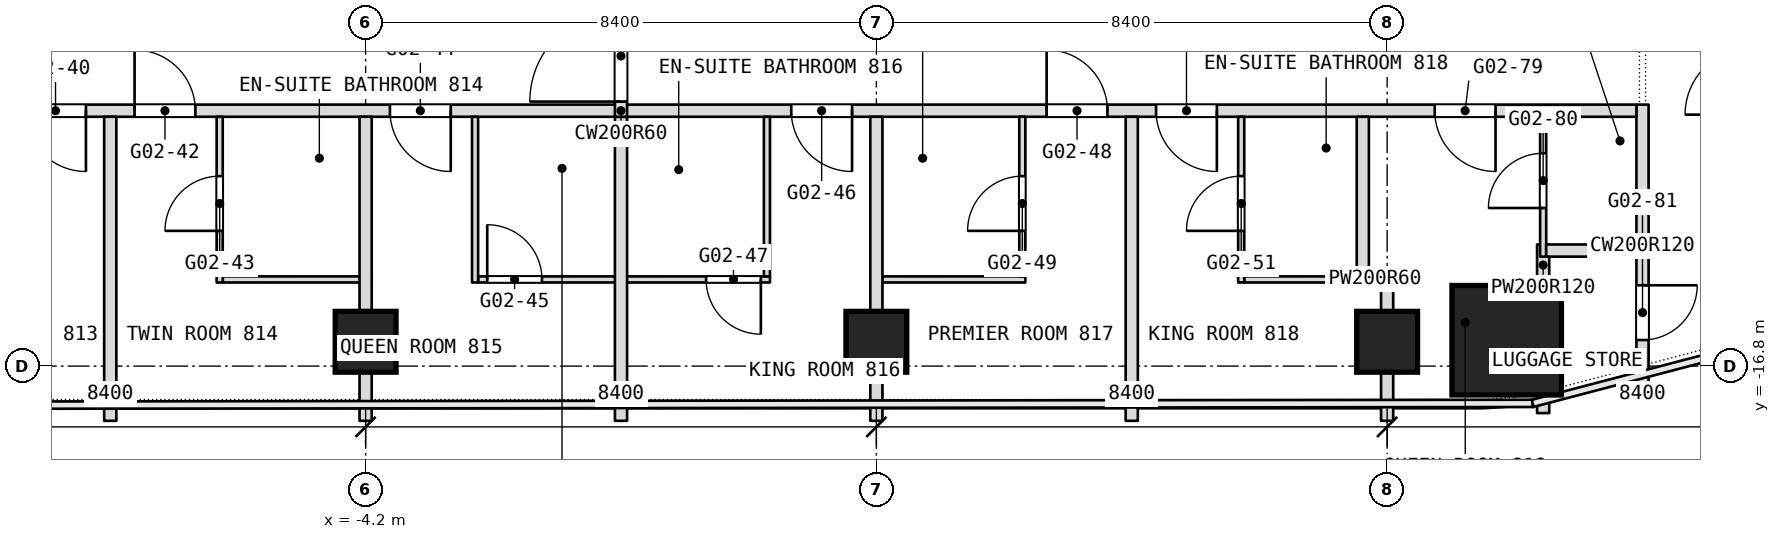
"""IFC4 building model, lengths in metres.
Left out: names, types, materials, properties, quantities, classifications, styles, units other than length and angle.
Written with IfcOpenShell. Run it as: python <this file> out.ifc"""

import sys

from ifc_helpers import new_model, si_unit, direction, frame, frame_2d, origin, origin_2d, place, context, subcontext, project, spatial, rectangle, extrude, element, fill, save


model = new_model("IFC4")
c1 = context("Model", 3, precision=1e-05, world=origin(), true_north=direction((0.0, 1.0)))
c2 = subcontext(c1, "Body", "Model", "MODEL_VIEW")
j1 = project(units=[si_unit("LENGTHUNIT", "METRE"), si_unit("PLANEANGLEUNIT", "RADIAN")], contexts=[c1])
p1 = place(None, origin())
s1 = spatial("IfcSite", under=j1, at=p1, CompositionType="ELEMENT")
p2 = place(p1, origin())
s2 = spatial("IfcBuilding", under=s1, at=p2, CompositionType="ELEMENT")
p3 = place(p2, frame((0.0, 0.0, 43.7)))
s3 = spatial("IfcBuildingStorey", under=s2, at=p3, CompositionType="ELEMENT", Elevation=43.7)
p4 = place(p3, frame((14.566, -16.375, 0.0), z_axis=(0.0, 0.0, 1.0), x_axis=(1.0, 0.0, 0.0)))
e1 = element("IfcColumn", 1, at=p4, inside=s3, PredefinedType="COLUMN", context=c2, shape_type="SweptSolid", body=[
    extrude(rectangle(XDim=1.8, YDim=1.8, at=origin_2d()), origin(), (0.0, 0.0, 1.0), 3.6),
])
for number, where, z_axis, x_axis in (
    (2, (12.6, -16.4, 0.0), (0.0, 0.0, 1.0), (1.0, 0.0, 0.0)),
    (3, (4.2, -16.4, 0.0), (0.0, 0.0, 1.0), (1.0, 0.0, 0.0)),
    (4, (-4.2, -16.4, 0.0), (0.0, 0.0, 1.0), (1.0, 0.0, 0.0)),
):
    element("IfcColumn", number, at=place(p3, frame(where, z_axis=z_axis, x_axis=x_axis)), inside=s3, PredefinedType="COLUMN", context=c2, shape_type="SweptSolid", body=[
        extrude(rectangle(XDim=1.0, YDim=1.0, at=origin_2d()), origin(), (0.0, 0.0, 1.0), 3.6),
    ])
p5 = place(p3, frame((16.8, -17.143, 0.0), z_axis=(0.0, 0.0, 1.0), x_axis=(0.0, 1.0, 0.0)))
e5 = element("IfcWall", 5, at=p5, inside=s3, PredefinedType="PARTITIONING", context=c2, shape_type="SweptSolid", body=[
    extrude(rectangle(XDim=4.643, YDim=0.2, at=frame_2d((2.322, 0.0))), origin(), (0.0, 0.0, 1.0), 3.34),
])
p6 = place(p5, frame((0.772, 0.0, 0.0)))
e6 = element("IfcOpeningElement", 6, at=p6, cuts=e5, PredefinedType="OPENING", context=c2, shape_type="SweptSolid", body=[
    extrude(rectangle(XDim=0.9, YDim=2.1, at=frame_2d((0.45, 1.05))), frame((0.0, 0.1, 0.0), z_axis=(0.0, -1.0, 0.0), x_axis=(1.0, 0.0, 0.0)), (0.0, 0.0, 1.0), 0.2),
])
p7 = place(p3, frame((12.1, -15.375, 0.0), z_axis=(0.0, 0.0, 1.0), x_axis=(1.0, 0.0, 0.0)))
e7 = element("IfcWall", 7, at=p7, inside=s3, PredefinedType="PARTITIONING", context=c2, shape_type="SweptSolid", body=[
    extrude(rectangle(XDim=0.6, YDim=0.2, at=frame_2d((0.3, 0.0))), origin(), (0.0, 0.0, 1.0), 3.34),
])
p8 = place(p3, frame((-6.55, -15.375, 0.0), z_axis=(0.0, 0.0, 1.0), x_axis=(1.0, 0.0, 0.0)))
e8 = element("IfcWall", 8, at=p8, inside=s3, PredefinedType="PARTITIONING", context=c2, shape_type="SweptSolid", body=[
    extrude(rectangle(XDim=2.45, YDim=0.1, at=frame_2d((1.225, 0.0))), origin(), (0.0, 0.0, 1.0), 3.34),
])
p9 = place(p3, frame((-2.35, -15.375, 0.0), z_axis=(0.0, 0.0, 1.0), x_axis=(1.0, 0.0, 0.0)))
e9 = element("IfcWall", 9, at=p9, inside=s3, PredefinedType="PARTITIONING", context=c2, shape_type="SweptSolid", body=[
    extrude(rectangle(XDim=4.8, YDim=0.1, at=frame_2d((2.4, 0.0))), origin(), (0.0, 0.0, 1.0), 3.34),
])
p10 = place(p9, frame((0.15, 0.0, 0.0)))
e10 = element("IfcOpeningElement", 10, at=p10, cuts=e9, PredefinedType="OPENING", context=c2, shape_type="SweptSolid", body=[
    extrude(rectangle(XDim=0.9, YDim=2.1, at=frame_2d((0.45, 1.05))), frame((0.0, 0.05, 0.0), z_axis=(0.0, -1.0, 0.0), x_axis=(1.0, 0.0, 0.0)), (0.0, 0.0, 1.0), 0.1),
])
p11 = place(p9, frame((3.75, 0.0, 0.0)))
e11 = element("IfcOpeningElement", 11, at=p11, cuts=e9, PredefinedType="OPENING", context=c2, shape_type="SweptSolid", body=[
    extrude(rectangle(XDim=0.9, YDim=2.1, at=frame_2d((0.45, 1.05))), frame((0.0, 0.05, 0.0), z_axis=(0.0, -1.0, 0.0), x_axis=(1.0, 0.0, 0.0)), (0.0, 0.0, 1.0), 0.1),
])
p12 = place(p3, frame((4.3, -15.375, 0.0), z_axis=(0.0, 0.0, 1.0), x_axis=(1.0, 0.0, 0.0)))
e12 = element("IfcWall", 12, at=p12, inside=s3, PredefinedType="PARTITIONING", context=c2, shape_type="SweptSolid", body=[
    extrude(rectangle(XDim=2.35, YDim=0.1, at=frame_2d((1.175, 0.0))), origin(), (0.0, 0.0, 1.0), 3.34),
])
p13 = place(p3, frame((10.25, -15.375, 0.0), z_axis=(0.0, 0.0, 1.0), x_axis=(1.0, 0.0, 0.0)))
e13 = element("IfcWall", 13, at=p13, inside=s3, PredefinedType="PARTITIONING", context=c2, shape_type="SweptSolid", body=[
    extrude(rectangle(XDim=2.05, YDim=0.1, at=frame_2d((1.025, 0.0))), origin(), (0.0, 0.0, 1.0), 3.34),
])
p14 = place(p3, frame((15.166, -17.573, 0.0), z_axis=(0.0, 0.0, 1.0), x_axis=(0.0, 1.0, 0.0)))
e14 = element("IfcWall", 14, at=p14, inside=s3, PredefinedType="PARTITIONING", context=c2, shape_type="SweptSolid", body=[
    extrude(rectangle(XDim=0.298, YDim=0.2, at=frame_2d((0.149, 0.0))), origin(), (0.0, 0.0, 1.0), 3.34),
])
p15 = place(p3, frame((15.166, -15.475, 0.0), z_axis=(0.0, 0.0, 1.0), x_axis=(0.0, 1.0, 0.0)))
e15 = element("IfcWall", 15, at=p15, inside=s3, PredefinedType="PARTITIONING", context=c2, shape_type="SweptSolid", body=[
    extrude(rectangle(XDim=0.675, YDim=0.2, at=frame_2d((0.337, 0.0))), origin(), (0.0, 0.0, 1.0), 3.34),
])
p16 = place(p3, frame((15.166, -15.0, 0.0), z_axis=(0.0, 0.0, 1.0), x_axis=(0.0, 1.0, 0.0)))
e16 = element("IfcWall", 16, at=p16, inside=s3, PredefinedType="PARTITIONING", context=c2, shape_type="SweptSolid", body=[
    extrude(rectangle(XDim=2.3, YDim=0.1, at=frame_2d((1.15, 0.0))), origin(), (0.0, 0.0, 1.0), 3.34),
])
p17 = place(p16, frame((0.8, 0.0, 0.0)))
e17 = element("IfcOpeningElement", 17, at=p17, cuts=e16, PredefinedType="OPENING", context=c2, shape_type="SweptSolid", body=[
    extrude(rectangle(XDim=0.9, YDim=2.1, at=frame_2d((0.45, 1.05))), frame((0.0, 0.05, 0.0), z_axis=(0.0, -1.0, 0.0), x_axis=(1.0, 0.0, 0.0)), (0.0, 0.0, 1.0), 0.1),
])
p18 = place(p3, frame((15.216, -14.9, 0.0), z_axis=(0.0, 0.0, 1.0), x_axis=(1.0, 0.0, 0.0)))
e18 = element("IfcWall", 18, at=p18, inside=s3, PredefinedType="PARTITIONING", context=c2, shape_type="SweptSolid", body=[
    extrude(rectangle(XDim=1.484, YDim=0.2, at=frame_2d((0.742, 0.0))), origin(), (0.0, 0.0, 1.0), 3.34),
])
p19 = place(p3, frame((12.6, -17.7, 0.0), z_axis=(0.0, 0.0, 1.0), x_axis=(0.0, 1.0, 0.0)))
e19 = element("IfcWall", 19, at=p19, inside=s3, PredefinedType="PARTITIONING", context=c2, shape_type="SweptSolid", body=[
    extrude(rectangle(XDim=2.225, YDim=0.2, at=frame_2d((1.112, 0.0))), origin(), (0.0, 0.0, 1.0), 3.34),
])
p20 = place(p3, frame((-16.7, -12.6, 0.0), z_axis=(0.0, 0.0, 1.0), x_axis=(1.0, 0.0, 0.0)))
e20 = element("IfcWall", 20, at=p20, inside=s3, PredefinedType="PARTITIONING", context=c2, shape_type="SweptSolid", body=[
    extrude(rectangle(XDim=33.4, YDim=0.2, at=frame_2d((16.7, 0.0))), origin(), (0.0, 0.0, 1.0), 3.34),
])
p21 = place(p20, frame((6.9, 0.0, 0.0)))
e21 = element("IfcOpeningElement", 21, at=p21, cuts=e20, PredefinedType="OPENING", context=c2, shape_type="SweptSolid", body=[
    extrude(rectangle(XDim=1.0, YDim=2.1, at=frame_2d((0.5, 1.05))), frame((0.0, 0.1, 0.0), z_axis=(0.0, -1.0, 0.0), x_axis=(1.0, 0.0, 0.0)), (0.0, 0.0, 1.0), 0.2),
])
p22 = place(p20, frame((8.7, 0.0, 0.0)))
e22 = element("IfcOpeningElement", 22, at=p22, cuts=e20, PredefinedType="OPENING", context=c2, shape_type="SweptSolid", body=[
    extrude(rectangle(XDim=1.0, YDim=2.1, at=frame_2d((0.5, 1.05))), frame((0.0, 0.1, 0.0), z_axis=(0.0, -1.0, 0.0), x_axis=(1.0, 0.0, 0.0)), (0.0, 0.0, 1.0), 0.2),
])
p23 = place(p20, frame((12.9, 0.0, 0.0)))
e23 = element("IfcOpeningElement", 23, at=p23, cuts=e20, PredefinedType="OPENING", context=c2, shape_type="SweptSolid", body=[
    extrude(rectangle(XDim=1.0, YDim=2.1, at=frame_2d((0.5, 1.05))), frame((0.0, 0.1, 0.0), z_axis=(0.0, -1.0, 0.0), x_axis=(1.0, 0.0, 0.0)), (0.0, 0.0, 1.0), 0.2),
])
p24 = place(p20, frame((19.5, 0.0, 0.0)))
e24 = element("IfcOpeningElement", 24, at=p24, cuts=e20, PredefinedType="OPENING", context=c2, shape_type="SweptSolid", body=[
    extrude(rectangle(XDim=1.0, YDim=2.1, at=frame_2d((0.5, 1.05))), frame((0.0, 0.1, 0.0), z_axis=(0.0, -1.0, 0.0), x_axis=(1.0, 0.0, 0.0)), (0.0, 0.0, 1.0), 0.2),
])
p25 = place(p20, frame((23.7, 0.0, 0.0)))
e25 = element("IfcOpeningElement", 25, at=p25, cuts=e20, PredefinedType="OPENING", context=c2, shape_type="SweptSolid", body=[
    extrude(rectangle(XDim=1.0, YDim=2.1, at=frame_2d((0.5, 1.05))), frame((0.0, 0.1, 0.0), z_axis=(0.0, -1.0, 0.0), x_axis=(1.0, 0.0, 0.0)), (0.0, 0.0, 1.0), 0.2),
])
p26 = place(p20, frame((25.5, 0.0, 0.0)))
e26 = element("IfcOpeningElement", 26, at=p26, cuts=e20, PredefinedType="OPENING", context=c2, shape_type="SweptSolid", body=[
    extrude(rectangle(XDim=1.0, YDim=2.1, at=frame_2d((0.5, 1.05))), frame((0.0, 0.1, 0.0), z_axis=(0.0, -1.0, 0.0), x_axis=(1.0, 0.0, 0.0)), (0.0, 0.0, 1.0), 0.2),
])
p27 = place(p20, frame((2.317, 0.0, 0.0)))
e27 = element("IfcOpeningElement", 27, at=p27, cuts=e20, PredefinedType="OPENING", context=c2, shape_type="SweptSolid", body=[
    extrude(rectangle(XDim=1.0, YDim=2.1, at=frame_2d((0.5, 1.05))), frame((0.0, 0.1, 0.0), z_axis=(0.0, -1.0, 0.0), x_axis=(1.0, 0.0, 0.0)), (0.0, 0.0, 1.0), 0.2),
])
p28 = place(p20, frame((30.083, 0.0, 0.0)))
e28 = element("IfcOpeningElement", 28, at=p28, cuts=e20, PredefinedType="OPENING", context=c2, shape_type="SweptSolid", body=[
    extrude(rectangle(XDim=1.0, YDim=2.1, at=frame_2d((0.5, 1.05))), frame((0.0, 0.1, 0.0), z_axis=(0.0, -1.0, 0.0), x_axis=(1.0, 0.0, 0.0)), (0.0, 0.0, 1.0), 0.2),
])
p29 = place(p3, frame((12.2, -15.325, 0.0), z_axis=(0.0, 0.0, 1.0), x_axis=(0.0, 1.0, 0.0)))
e29 = element("IfcWall", 29, at=p29, inside=s3, PredefinedType="PARTITIONING", context=c2, shape_type="SweptSolid", body=[
    extrude(rectangle(XDim=2.625, YDim=0.2, at=frame_2d((1.312, 0.0))), origin(), (0.0, 0.0, 1.0), 3.34),
])
p30 = place(p3, frame((10.2, -15.425, 0.0), z_axis=(0.0, 0.0, 1.0), x_axis=(0.0, 1.0, 0.0)))
e30 = element("IfcWall", 30, at=p30, inside=s3, PredefinedType="PARTITIONING", context=c2, shape_type="SweptSolid", body=[
    extrude(rectangle(XDim=2.725, YDim=0.1, at=frame_2d((1.363, 0.0))), origin(), (0.0, 0.0, 1.0), 3.34),
])
p31 = place(p30, frame((0.849, 0.0, 0.0)))
e31 = element("IfcOpeningElement", 31, at=p31, cuts=e30, PredefinedType="OPENING", context=c2, shape_type="SweptSolid", body=[
    extrude(rectangle(XDim=0.9, YDim=2.1, at=frame_2d((0.45, 1.05))), frame((0.0, 0.05, 0.0), z_axis=(0.0, -1.0, 0.0), x_axis=(1.0, 0.0, 0.0)), (0.0, 0.0, 1.0), 0.1),
])
p32 = place(p3, frame((8.4, -17.7, 0.0), z_axis=(0.0, 0.0, 1.0), x_axis=(0.0, 1.0, 0.0)))
e32 = element("IfcWall", 32, at=p32, inside=s3, PredefinedType="PARTITIONING", context=c2, shape_type="SweptSolid", body=[
    extrude(rectangle(XDim=5.0, YDim=0.2, at=frame_2d((2.5, 0.0))), origin(), (0.0, 0.0, 1.0), 3.34),
])
p33 = place(p3, frame((6.6, -15.325, 0.0), z_axis=(0.0, 0.0, 1.0), x_axis=(0.0, 1.0, 0.0)))
e33 = element("IfcWall", 33, at=p33, inside=s3, PredefinedType="PARTITIONING", context=c2, shape_type="SweptSolid", body=[
    extrude(rectangle(XDim=2.625, YDim=0.1, at=frame_2d((1.312, 0.0))), origin(), (0.0, 0.0, 1.0), 3.34),
])
p34 = place(p33, frame((0.749, 0.0, 0.0)))
e34 = element("IfcOpeningElement", 34, at=p34, cuts=e33, PredefinedType="OPENING", context=c2, shape_type="SweptSolid", body=[
    extrude(rectangle(XDim=0.9, YDim=2.1, at=frame_2d((0.45, 1.05))), frame((0.0, 0.05, 0.0), z_axis=(0.0, -1.0, 0.0), x_axis=(1.0, 0.0, 0.0)), (0.0, 0.0, 1.0), 0.1),
])
p35 = place(p3, frame((4.2, -17.7, 0.0), z_axis=(0.0, 0.0, 1.0), x_axis=(0.0, 1.0, 0.0)))
e35 = element("IfcWall", 35, at=p35, inside=s3, PredefinedType="PARTITIONING", context=c2, shape_type="SweptSolid", body=[
    extrude(rectangle(XDim=5.0, YDim=0.2, at=frame_2d((2.5, 0.0))), origin(), (0.0, 0.0, 1.0), 3.34),
])
p36 = place(p3, frame((2.4, -15.325, 0.0), z_axis=(0.0, 0.0, 1.0), x_axis=(0.0, 1.0, 0.0)))
e36 = element("IfcWall", 36, at=p36, inside=s3, PredefinedType="PARTITIONING", context=c2, shape_type="SweptSolid", body=[
    extrude(rectangle(XDim=2.625, YDim=0.1, at=frame_2d((1.312, 0.0))), origin(), (0.0, 0.0, 1.0), 3.34),
])
p37 = place(p3, frame((0.0, -17.7, 0.0), z_axis=(0.0, 0.0, 1.0), x_axis=(0.0, 1.0, 0.0)))
e37 = element("IfcWall", 37, at=p37, inside=s3, PredefinedType="PARTITIONING", context=c2, shape_type="SweptSolid", body=[
    extrude(rectangle(XDim=5.0, YDim=0.2, at=frame_2d((2.5, 0.0))), origin(), (0.0, 0.0, 1.0), 3.34),
])
p38 = place(p3, frame((0.0, -12.7, 0.0), z_axis=(0.0, 0.0, 1.0), x_axis=(0.0, 1.0, 0.0)))
e38 = element("IfcWall", 38, at=p38, inside=s3, PredefinedType="PARTITIONING", context=c2, shape_type="SweptSolid", body=[
    extrude(rectangle(XDim=12.7, YDim=0.2, at=frame_2d((6.35, 0.0))), origin(), (0.0, 0.0, 1.0), 3.34),
])
p39 = place(p38, frame((11.05, 0.0, 0.0)))
e39 = element("IfcOpeningElement", 39, at=p39, cuts=e38, PredefinedType="OPENING", context=c2, shape_type="SweptSolid", body=[
    extrude(rectangle(XDim=1.5, YDim=2.1, at=frame_2d((0.75, 1.05))), frame((0.0, 0.1, 0.0), z_axis=(0.0, -1.0, 0.0), x_axis=(1.0, 0.0, 0.0)), (0.0, 0.0, 1.0), 0.2),
])
p40 = place(p38, frame((0.25, 0.0, 0.0)))
e40 = element("IfcOpeningElement", 40, at=p40, cuts=e38, PredefinedType="OPENING", context=c2, shape_type="SweptSolid", body=[
    extrude(rectangle(XDim=1.5, YDim=2.1, at=frame_2d((0.75, 1.05))), frame((0.0, 0.1, 0.0), z_axis=(0.0, -1.0, 0.0), x_axis=(1.0, 0.0, 0.0)), (0.0, 0.0, 1.0), 0.2),
])
p41 = place(p3, frame((-2.4, -15.425, 0.0), z_axis=(0.0, 0.0, 1.0), x_axis=(0.0, 1.0, 0.0)))
e41 = element("IfcWall", 41, at=p41, inside=s3, PredefinedType="PARTITIONING", context=c2, shape_type="SweptSolid", body=[
    extrude(rectangle(XDim=2.725, YDim=0.1, at=frame_2d((1.363, 0.0))), origin(), (0.0, 0.0, 1.0), 3.34),
])
p42 = place(p3, frame((-4.2, -17.7, 0.0), z_axis=(0.0, 0.0, 1.0), x_axis=(0.0, 1.0, 0.0)))
e42 = element("IfcWall", 42, at=p42, inside=s3, PredefinedType="PARTITIONING", context=c2, shape_type="SweptSolid", body=[
    extrude(rectangle(XDim=5.0, YDim=0.2, at=frame_2d((2.5, 0.0))), origin(), (0.0, 0.0, 1.0), 3.34),
])
p43 = place(p3, frame((-6.6, -15.425, 0.0), z_axis=(0.0, 0.0, 1.0), x_axis=(0.0, 1.0, 0.0)))
e43 = element("IfcWall", 43, at=p43, inside=s3, PredefinedType="PARTITIONING", context=c2, shape_type="SweptSolid", body=[
    extrude(rectangle(XDim=2.725, YDim=0.1, at=frame_2d((1.363, 0.0))), origin(), (0.0, 0.0, 1.0), 3.34),
])
p44 = place(p43, frame((0.849, 0.0, 0.0)))
e44 = element("IfcOpeningElement", 44, at=p44, cuts=e43, PredefinedType="OPENING", context=c2, shape_type="SweptSolid", body=[
    extrude(rectangle(XDim=0.9, YDim=2.1, at=frame_2d((0.45, 1.05))), frame((0.0, 0.05, 0.0), z_axis=(0.0, -1.0, 0.0), x_axis=(1.0, 0.0, 0.0)), (0.0, 0.0, 1.0), 0.1),
])
p45 = place(p3, frame((-8.4, -17.7, 0.0), z_axis=(0.0, 0.0, 1.0), x_axis=(0.0, 1.0, 0.0)))
e45 = element("IfcWall", 45, at=p45, inside=s3, PredefinedType="PARTITIONING", context=c2, shape_type="SweptSolid", body=[
    extrude(rectangle(XDim=5.0, YDim=0.2, at=frame_2d((2.5, 0.0))), origin(), (0.0, 0.0, 1.0), 3.34),
])
p46 = place(p6, origin())
e46 = element("IfcDoor", 46, at=p46, inside=s3, OperationType="SINGLE_SWING_RIGHT", PredefinedType="DOOR", context=c2, shape_type="SweptSolid", body=[
    extrude(rectangle(XDim=0.9, YDim=2.1, at=frame_2d((0.45, 1.05))), frame((0.0, 0.025, 0.0), z_axis=(0.0, -1.0, 0.0), x_axis=(1.0, 0.0, 0.0)), (0.0, 0.0, 1.0), 0.05),
])
fill(e6, e46)
p47 = place(p10, origin())
e47 = element("IfcDoor", 47, at=p47, inside=s3, OperationType="SINGLE_SWING_LEFT", PredefinedType="DOOR", context=c2, shape_type="SweptSolid", body=[
    extrude(rectangle(XDim=0.9, YDim=2.1, at=frame_2d((0.45, 1.05))), frame((0.0, 0.025, 0.0), z_axis=(0.0, -1.0, 0.0), x_axis=(1.0, 0.0, 0.0)), (0.0, 0.0, 1.0), 0.05),
])
fill(e10, e47)
p48 = place(p11, origin())
e48 = element("IfcDoor", 48, at=p48, inside=s3, OperationType="SINGLE_SWING_RIGHT", PredefinedType="DOOR", context=c2, shape_type="SweptSolid", body=[
    extrude(rectangle(XDim=0.9, YDim=2.1, at=frame_2d((0.45, 1.05))), frame((0.0, 0.025, 0.0), z_axis=(0.0, -1.0, 0.0), x_axis=(1.0, 0.0, 0.0)), (0.0, 0.0, 1.0), 0.05),
])
fill(e11, e48)
p49 = place(p17, origin())
e49 = element("IfcDoor", 49, at=p49, inside=s3, OperationType="SINGLE_SWING_RIGHT", PredefinedType="DOOR", context=c2, shape_type="SweptSolid", body=[
    extrude(rectangle(XDim=0.9, YDim=2.1, at=frame_2d((0.45, 1.05))), frame((0.0, 0.025, 0.0), z_axis=(0.0, -1.0, 0.0), x_axis=(1.0, 0.0, 0.0)), (0.0, 0.0, 1.0), 0.05),
])
fill(e17, e49)
p50 = place(p21, origin())
e50 = element("IfcDoor", 50, at=p50, inside=s3, OperationType="SINGLE_SWING_RIGHT", PredefinedType="DOOR", context=c2, shape_type="SweptSolid", body=[
    extrude(rectangle(XDim=1.0, YDim=2.1, at=frame_2d((0.5, 1.05))), frame((0.0, 0.025, 0.0), z_axis=(0.0, -1.0, 0.0), x_axis=(1.0, 0.0, 0.0)), (0.0, 0.0, 1.0), 0.05),
])
fill(e21, e50)
p51 = place(p22, origin())
e51 = element("IfcDoor", 51, at=p51, inside=s3, OperationType="SINGLE_SWING_RIGHT", PredefinedType="DOOR", context=c2, shape_type="SweptSolid", body=[
    extrude(rectangle(XDim=1.0, YDim=2.1, at=frame_2d((0.5, 1.05))), frame((0.0, 0.025, 0.0), z_axis=(0.0, -1.0, 0.0), x_axis=(1.0, 0.0, 0.0)), (0.0, 0.0, 1.0), 0.05),
])
fill(e22, e51)
p52 = place(p23, origin())
e52 = element("IfcDoor", 52, at=p52, inside=s3, OperationType="SINGLE_SWING_RIGHT", PredefinedType="DOOR", context=c2, shape_type="SweptSolid", body=[
    extrude(rectangle(XDim=1.0, YDim=2.1, at=frame_2d((0.5, 1.05))), frame((0.0, 0.025, 0.0), z_axis=(0.0, -1.0, 0.0), x_axis=(1.0, 0.0, 0.0)), (0.0, 0.0, 1.0), 0.05),
])
fill(e23, e52)
p53 = place(p24, origin())
e53 = element("IfcDoor", 53, at=p53, inside=s3, OperationType="SINGLE_SWING_RIGHT", PredefinedType="DOOR", context=c2, shape_type="SweptSolid", body=[
    extrude(rectangle(XDim=1.0, YDim=2.1, at=frame_2d((0.5, 1.05))), frame((0.0, 0.025, 0.0), z_axis=(0.0, -1.0, 0.0), x_axis=(1.0, 0.0, 0.0)), (0.0, 0.0, 1.0), 0.05),
])
fill(e24, e53)
p54 = place(p25, origin())
e54 = element("IfcDoor", 54, at=p54, inside=s3, OperationType="SINGLE_SWING_RIGHT", PredefinedType="DOOR", context=c2, shape_type="SweptSolid", body=[
    extrude(rectangle(XDim=1.0, YDim=2.1, at=frame_2d((0.5, 1.05))), frame((0.0, 0.025, 0.0), z_axis=(0.0, -1.0, 0.0), x_axis=(1.0, 0.0, 0.0)), (0.0, 0.0, 1.0), 0.05),
])
fill(e25, e54)
p55 = place(p26, origin())
e55 = element("IfcDoor", 55, at=p55, inside=s3, OperationType="SINGLE_SWING_RIGHT", PredefinedType="DOOR", context=c2, shape_type="SweptSolid", body=[
    extrude(rectangle(XDim=1.0, YDim=2.1, at=frame_2d((0.5, 1.05))), frame((0.0, 0.025, 0.0), z_axis=(0.0, -1.0, 0.0), x_axis=(1.0, 0.0, 0.0)), (0.0, 0.0, 1.0), 0.05),
])
fill(e26, e55)
p56 = place(p28, origin())
e56 = element("IfcDoor", 56, at=p56, inside=s3, OperationType="SINGLE_SWING_LEFT", PredefinedType="DOOR", context=c2, shape_type="SweptSolid", body=[
    extrude(rectangle(XDim=1.0, YDim=2.1, at=frame_2d((0.5, 1.05))), frame((0.0, 0.025, 0.0), z_axis=(0.0, -1.0, 0.0), x_axis=(1.0, 0.0, 0.0)), (0.0, 0.0, 1.0), 0.05),
])
fill(e28, e56)
p57 = place(p31, origin())
e57 = element("IfcDoor", 57, at=p57, inside=s3, OperationType="SINGLE_SWING_RIGHT", PredefinedType="DOOR", context=c2, shape_type="SweptSolid", body=[
    extrude(rectangle(XDim=0.9, YDim=2.1, at=frame_2d((0.45, 1.05))), frame((0.0, 0.025, 0.0), z_axis=(0.0, -1.0, 0.0), x_axis=(1.0, 0.0, 0.0)), (0.0, 0.0, 1.0), 0.05),
])
fill(e31, e57)
p58 = place(p34, origin())
e58 = element("IfcDoor", 58, at=p58, inside=s3, OperationType="SINGLE_SWING_LEFT", PredefinedType="DOOR", context=c2, shape_type="SweptSolid", body=[
    extrude(rectangle(XDim=0.9, YDim=2.1, at=frame_2d((0.45, 1.05))), frame((0.0, 0.025, 0.0), z_axis=(0.0, -1.0, 0.0), x_axis=(1.0, 0.0, 0.0)), (0.0, 0.0, 1.0), 0.05),
])
fill(e34, e58)
p59 = place(p44, origin())
e59 = element("IfcDoor", 59, at=p59, inside=s3, OperationType="SINGLE_SWING_RIGHT", PredefinedType="DOOR", context=c2, shape_type="SweptSolid", body=[
    extrude(rectangle(XDim=0.9, YDim=2.1, at=frame_2d((0.45, 1.05))), frame((0.0, 0.025, 0.0), z_axis=(0.0, -1.0, 0.0), x_axis=(1.0, 0.0, 0.0)), (0.0, 0.0, 1.0), 0.05),
])
fill(e44, e59)
p60 = place(p40, origin())
e60 = element("IfcDoor", 60, at=p60, inside=s3, OperationType="DOUBLE_DOOR_DOUBLE_SWING", PredefinedType="DOOR", context=c2, shape_type="SweptSolid", body=[
    extrude(rectangle(XDim=1.5, YDim=2.1, at=frame_2d((0.75, 1.05))), frame((0.0, 0.025, 0.0), z_axis=(0.0, -1.0, 0.0), x_axis=(1.0, 0.0, 0.0)), (0.0, 0.0, 1.0), 0.05),
])
fill(e40, e60)
save(model, sys.argv[1])
